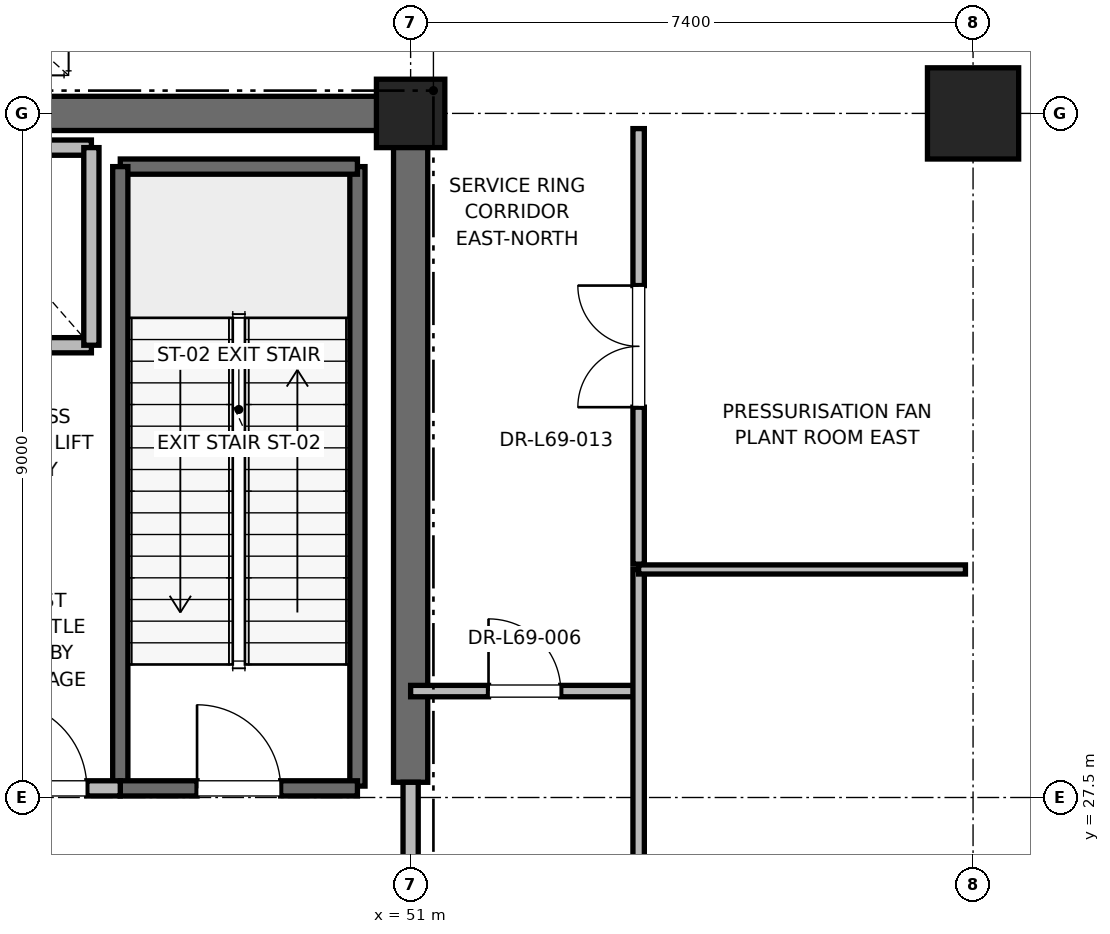
"""IFC4 building model, lengths in metres.
Left out: names, types, materials, properties, quantities, classifications, styles, units other than length and angle.
Written with IfcOpenShell. Run it as: python <this file> out.ifc"""

import sys

from ifc_helpers import new_model, si_unit, direction, frame, frame_2d, origin, origin_2d, place, context, subcontext, project, spatial, rectangle, extrude, element, fill, save


model = new_model("IFC4")
c1 = context("Model", 3, precision=1e-05, world=origin(), true_north=direction((0.0, 1.0)))
c2 = subcontext(c1, "Body", "Model", "MODEL_VIEW")
j1 = project(units=[si_unit("LENGTHUNIT", "METRE"), si_unit("PLANEANGLEUNIT", "RADIAN")], contexts=[c1])
p1 = place(None, origin())
s1 = spatial("IfcSite", under=j1, at=p1, CompositionType="ELEMENT")
p2 = place(p1, origin())
s2 = spatial("IfcBuilding", under=s1, at=p2, CompositionType="ELEMENT")
p3 = place(p2, frame((0.0, 0.0, 295.2)))
s3 = spatial("IfcBuildingStorey", under=s2, at=p3, CompositionType="ELEMENT", Elevation=295.2)
p4 = place(p3, frame((58.4, 36.5, 0.0), z_axis=(0.0, 0.0, 1.0), x_axis=(1.0, 0.0, 0.0)))
e1 = element("IfcColumn", 1, at=p4, inside=s3, PredefinedType="COLUMN", context=c2, shape_type="SweptSolid", body=[
    extrude(rectangle(XDim=1.2, YDim=1.2, at=origin_2d()), origin(), (0.0, 0.0, 1.0), 5.8),
])
p5 = place(p3, frame((51.0, 36.5, 0.0), z_axis=(0.0, 0.0, 1.0), x_axis=(1.0, 0.0, 0.0)))
e2 = element("IfcColumn", 2, at=p5, inside=s3, PredefinedType="PILASTER", context=c2, shape_type="SweptSolid", body=[
    extrude(rectangle(XDim=0.9, YDim=0.9, at=origin_2d()), origin(), (0.0, 0.0, 1.0), 5.8),
])
p6 = place(p3, frame((45.2, 36.5, 0.0), z_axis=(0.0, 0.0, 1.0), x_axis=(1.0, 0.0, 0.0)))
e3 = element("IfcWall", 3, at=p6, inside=s3, PredefinedType="SHEAR", context=c2, shape_type="SweptSolid", body=[
    extrude(rectangle(XDim=5.8, YDim=0.45, at=frame_2d((2.9, 0.0))), origin(), (0.0, 0.0, 1.0), 5.5),
])
p7 = place(p3, frame((51.0, 27.7, 0.0), z_axis=(0.0, 0.0, 1.0), x_axis=(0.0, 1.0, 0.0)))
e4 = element("IfcWall", 4, at=p7, inside=s3, PredefinedType="SHEAR", context=c2, shape_type="SweptSolid", body=[
    extrude(rectangle(XDim=8.8, YDim=0.45, at=frame_2d((4.4, 0.0))), origin(), (0.0, 0.0, 1.0), 5.5),
])
p8 = place(p3, frame((50.3, 27.65, 0.0), z_axis=(0.0, 0.0, 1.0), x_axis=(0.0, 1.0, 0.0)))
e5 = element("IfcWall", 5, at=p8, inside=s3, PredefinedType="SOLIDWALL", context=c2, shape_type="SweptSolid", body=[
    extrude(rectangle(XDim=8.15, YDim=0.2, at=frame_2d((4.075, 0.0))), origin(), (0.0, 0.0, 1.0), 5.5),
])
p9 = place(p3, frame((47.18, 35.8, 0.0), z_axis=(0.0, 0.0, 1.0), x_axis=(1.0, 0.0, 0.0)))
e6 = element("IfcWall", 6, at=p9, inside=s3, PredefinedType="SOLIDWALL", context=c2, shape_type="SweptSolid", body=[
    extrude(rectangle(XDim=3.12, YDim=0.2, at=frame_2d((1.56, 0.0))), origin(), (0.0, 0.0, 1.0), 5.5),
])
p10 = place(p3, frame((47.18, 27.62, 0.0), z_axis=(0.0, 0.0, 1.0), x_axis=(0.0, 1.0, 0.0)))
e7 = element("IfcWall", 7, at=p10, inside=s3, PredefinedType="SOLIDWALL", context=c2, shape_type="SweptSolid", body=[
    extrude(rectangle(XDim=8.18, YDim=0.2, at=frame_2d((4.09, 0.0))), origin(), (0.0, 0.0, 1.0), 5.5),
])
p11 = place(p3, frame((47.18, 27.62, 0.0), z_axis=(0.0, 0.0, 1.0), x_axis=(1.0, 0.0, 0.0)))
e8 = element("IfcWall", 8, at=p11, inside=s3, PredefinedType="SOLIDWALL", context=c2, shape_type="SweptSolid", body=[
    extrude(rectangle(XDim=3.12, YDim=0.2, at=frame_2d((1.56, 0.0))), origin(), (0.0, 0.0, 1.0), 5.5),
])
p12 = place(p11, frame((1.01, 0.0, 0.0)))
e9 = element("IfcOpeningElement", 9, at=p12, cuts=e8, PredefinedType="OPENING", context=c2, shape_type="SweptSolid", body=[
    extrude(rectangle(XDim=1.1, YDim=2.15, at=frame_2d((0.55, 1.075))), frame((0.0, 0.1, 0.0), z_axis=(0.0, -1.0, 0.0), x_axis=(1.0, 0.0, 0.0)), (0.0, 0.0, 1.0), 0.2),
])
p13 = place(p3, frame((45.15, 27.62, 0.0), z_axis=(0.0, 0.0, 1.0), x_axis=(1.0, 0.0, 0.0)))
e10 = element("IfcWall", 10, at=p13, inside=s3, PredefinedType="PARTITIONING", context=c2, shape_type="SweptSolid", body=[
    extrude(rectangle(XDim=2.03, YDim=0.2, at=frame_2d((1.015, 0.0))), origin(), (0.0, 0.0, 1.0), 5.5),
])
p14 = place(p13, frame((0.44, 0.0, 0.0)))
e11 = element("IfcOpeningElement", 11, at=p14, cuts=e10, PredefinedType="OPENING", context=c2, shape_type="SweptSolid", body=[
    extrude(rectangle(XDim=1.15, YDim=2.2, at=frame_2d((0.575, 1.1))), frame((0.0, 0.1, 0.0), z_axis=(0.0, -1.0, 0.0), x_axis=(1.0, 0.0, 0.0)), (0.0, 0.0, 1.0), 0.2),
])
p15 = place(p3, frame((51.0, 24.3, 0.0), z_axis=(0.0, 0.0, 1.0), x_axis=(0.0, 1.0, 0.0)))
e12 = element("IfcWall", 12, at=p15, inside=s3, PredefinedType="PARTITIONING", context=c2, shape_type="SweptSolid", body=[
    extrude(rectangle(XDim=3.4, YDim=0.2, at=frame_2d((1.7, 0.0))), origin(), (0.0, 0.0, 1.0), 4.58),
])
p16 = place(p15, frame((1.125, 0.0, 0.0)))
e13 = element("IfcOpeningElement", 13, at=p16, cuts=e12, PredefinedType="OPENING", context=c2, shape_type="SweptSolid", body=[
    extrude(rectangle(XDim=1.15, YDim=2.2, at=frame_2d((0.575, 1.1))), frame((0.0, 0.1, 0.0), z_axis=(0.0, -1.0, 0.0), x_axis=(1.0, 0.0, 0.0)), (0.0, 0.0, 1.0), 0.2),
])
p17 = place(p3, frame((44.5, 33.45, 0.0), z_axis=(0.0, 0.0, 1.0), x_axis=(1.0, 0.0, 0.0)))
e14 = element("IfcWall", 14, at=p17, inside=s3, PredefinedType="SOLIDWALL", context=c2, shape_type="SweptSolid", body=[
    extrude(rectangle(XDim=2.3, YDim=0.2, at=frame_2d((1.15, 0.0))), origin(), (0.0, 0.0, 1.0), 5.5),
])
p18 = place(p3, frame((46.8, 36.05, 0.0), z_axis=(0.0, 0.0, 1.0), x_axis=(-1.0, 0.0, 0.0)))
e15 = element("IfcWall", 15, at=p18, inside=s3, PredefinedType="SOLIDWALL", context=c2, shape_type="SweptSolid", body=[
    extrude(rectangle(XDim=2.3, YDim=0.2, at=frame_2d((1.15, 0.0))), origin(), (0.0, 0.0, 1.0), 4.58),
])
p19 = place(p3, frame((46.8, 33.45, 0.0), z_axis=(0.0, 0.0, 1.0), x_axis=(0.0, 1.0, 0.0)))
e16 = element("IfcWall", 16, at=p19, inside=s3, PredefinedType="SOLIDWALL", context=c2, shape_type="SweptSolid", body=[
    extrude(rectangle(XDim=2.6, YDim=0.2, at=frame_2d((1.3, 0.0))), origin(), (0.0, 0.0, 1.0), 5.5),
])
p20 = place(p3, frame((51.0, 28.9, 0.0), z_axis=(0.0, 0.0, 1.0), x_axis=(1.0, 0.0, 0.0)))
e17 = element("IfcWall", 17, at=p20, inside=s3, PredefinedType="PARTITIONING", context=c2, shape_type="SweptSolid", body=[
    extrude(rectangle(XDim=3.0, YDim=0.15, at=frame_2d((1.5, 0.0))), origin(), (0.0, 0.0, 1.0), 2.85),
])
p21 = place(p20, frame((1.025, 0.0, 0.0)))
e18 = element("IfcOpeningElement", 18, at=p21, cuts=e17, PredefinedType="OPENING", context=c2, shape_type="SweptSolid", body=[
    extrude(rectangle(XDim=0.95, YDim=2.15, at=frame_2d((0.475, 1.075))), frame((0.0, 0.075, 0.0), z_axis=(0.0, -1.0, 0.0), x_axis=(1.0, 0.0, 0.0)), (0.0, 0.0, 1.0), 0.15),
])
p22 = place(p3, frame((54.0, 18.7, 0.0), z_axis=(0.0, 0.0, 1.0), x_axis=(0.0, 1.0, 0.0)))
e19 = element("IfcWall", 19, at=p22, inside=s3, PredefinedType="PARTITIONING", context=c2, shape_type="SweptSolid", body=[
    extrude(rectangle(XDim=11.8, YDim=0.15, at=frame_2d((5.9, 0.0))), origin(), (0.0, 0.0, 1.0), 2.85),
])
p23 = place(p22, frame((6.825, 0.0, 0.0)))
e20 = element("IfcOpeningElement", 20, at=p23, cuts=e19, PredefinedType="OPENING", context=c2, shape_type="SweptSolid", body=[
    extrude(rectangle(XDim=0.95, YDim=2.15, at=frame_2d((0.475, 1.075))), frame((0.0, 0.075, 0.0), z_axis=(0.0, -1.0, 0.0), x_axis=(1.0, 0.0, 0.0)), (0.0, 0.0, 1.0), 0.15),
])
p24 = place(p3, frame((54.0, 30.5, 0.0), z_axis=(0.0, 0.0, 1.0), x_axis=(1.0, 0.0, 0.0)))
e21 = element("IfcWall", 21, at=p24, inside=s3, PredefinedType="PARTITIONING", context=c2, shape_type="SweptSolid", body=[
    extrude(rectangle(XDim=4.3, YDim=0.12, at=frame_2d((2.15, 0.0))), origin(), (0.0, 0.0, 1.0), 2.85),
])
p25 = place(p3, frame((54.0, 30.57, 0.0), z_axis=(0.0, 0.0, 1.0), x_axis=(0.0, 1.0, 0.0)))
e22 = element("IfcWall", 22, at=p25, inside=s3, PredefinedType="PARTITIONING", context=c2, shape_type="SweptSolid", body=[
    extrude(rectangle(XDim=5.73, YDim=0.15, at=frame_2d((2.865, 0.0))), origin(), (0.0, 0.0, 1.0), 2.85),
])
p26 = place(p25, frame((2.065, 0.0, 0.0)))
e23 = element("IfcOpeningElement", 23, at=p26, cuts=e22, PredefinedType="OPENING", context=c2, shape_type="SweptSolid", body=[
    extrude(rectangle(XDim=1.6, YDim=2.25, at=frame_2d((0.8, 1.125))), frame((0.0, 0.075, 0.0), z_axis=(0.0, -1.0, 0.0), x_axis=(1.0, 0.0, 0.0)), (0.0, 0.0, 1.0), 0.15),
])
p27 = place(p12, origin())
e24 = element("IfcDoor", 24, at=p27, inside=s3, OperationType="SINGLE_SWING_LEFT", PredefinedType="DOOR", context=c2, shape_type="SweptSolid", body=[
    extrude(rectangle(XDim=1.1, YDim=2.15, at=frame_2d((0.55, 1.075))), frame((0.0, 0.025, 0.0), z_axis=(0.0, -1.0, 0.0), x_axis=(1.0, 0.0, 0.0)), (0.0, 0.0, 1.0), 0.05),
])
fill(e9, e24)
p28 = place(p14, origin())
e25 = element("IfcDoor", 25, at=p28, inside=s3, OperationType="SINGLE_SWING_LEFT", PredefinedType="DOOR", context=c2, shape_type="SweptSolid", body=[
    extrude(rectangle(XDim=1.15, YDim=2.2, at=frame_2d((0.575, 1.1))), frame((0.0, 0.025, 0.0), z_axis=(0.0, -1.0, 0.0), x_axis=(1.0, 0.0, 0.0)), (0.0, 0.0, 1.0), 0.05),
])
fill(e11, e25)
p29 = place(p21, origin())
e26 = element("IfcDoor", 26, at=p29, inside=s3, OperationType="SINGLE_SWING_LEFT", PredefinedType="DOOR", context=c2, shape_type="SweptSolid", body=[
    extrude(rectangle(XDim=0.95, YDim=2.15, at=frame_2d((0.475, 1.075))), frame((0.0, 0.025, 0.0), z_axis=(0.0, -1.0, 0.0), x_axis=(1.0, 0.0, 0.0)), (0.0, 0.0, 1.0), 0.05),
])
fill(e18, e26)
p30 = place(p26, origin())
e27 = element("IfcDoor", 27, at=p30, inside=s3, OperationType="DOUBLE_DOOR_SINGLE_SWING", PredefinedType="DOOR", context=c2, shape_type="SweptSolid", body=[
    extrude(rectangle(XDim=1.6, YDim=2.25, at=frame_2d((0.8, 1.125))), frame((0.0, 0.025, 0.0), z_axis=(0.0, -1.0, 0.0), x_axis=(1.0, 0.0, 0.0)), (0.0, 0.0, 1.0), 0.05),
])
fill(e23, e27)
save(model, sys.argv[1])
